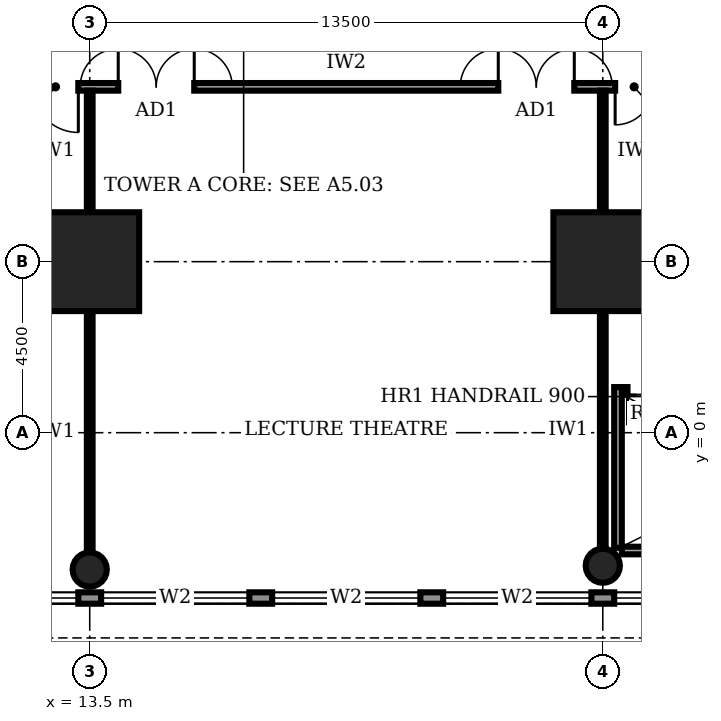
"""IFC4 building model, lengths in metres.
Left out: names, types, materials, properties, quantities, classifications, styles, units other than length and angle.
Written with IfcOpenShell. Run it as: python <this file> out.ifc"""

import sys

from ifc_helpers import new_model, si_unit, direction, frame, frame_2d, origin, origin_2d, place, context, subcontext, project, spatial, rectangle, circle, extrude, element, fill, save


model = new_model("IFC4")
c1 = context("Model", 3, precision=1e-05, world=origin(), true_north=direction((0.0, 1.0)))
c2 = subcontext(c1, "Body", "Model", "MODEL_VIEW")
j1 = project(units=[si_unit("LENGTHUNIT", "METRE"), si_unit("PLANEANGLEUNIT", "RADIAN")], contexts=[c1])
p1 = place(None, origin())
s1 = spatial("IfcSite", under=j1, at=p1, CompositionType="ELEMENT")
p2 = place(p1, origin())
s2 = spatial("IfcBuilding", under=s1, at=p2, CompositionType="ELEMENT")
p3 = place(p2, frame((0.0, 0.0, 6.0)))
s3 = spatial("IfcBuildingStorey", under=s2, at=p3, CompositionType="ELEMENT", Elevation=6.0)
for number, where, z_axis, x_axis in (
    (1, (13.5, 4.5, 0.0), (0.0, 0.0, 1.0), (1.0, 0.0, 0.0)),
    (2, (27.0, 4.5, 0.0), (0.0, 0.0, 1.0), (1.0, 0.0, 0.0)),
):
    element("IfcColumn", number, at=place(p3, frame(where, z_axis=z_axis, x_axis=x_axis)), inside=s3, PredefinedType="COLUMN", context=c2, shape_type="SweptSolid", body=[
        extrude(rectangle(XDim=2.6, YDim=2.6, at=origin_2d()), origin(), (0.0, 0.0, 1.0), 5.0),
    ])
for number, where, z_axis, x_axis in (
    (3, (13.5, -3.6, 0.0), (0.0, 0.0, 1.0), (1.0, 0.0, 0.0)),
    (4, (27.0, -3.5, 0.0), (0.0, 0.0, 1.0), (1.0, 0.0, 0.0)),
):
    element("IfcColumn", number, at=place(p3, frame(where, z_axis=z_axis, x_axis=x_axis)), inside=s3, PredefinedType="COLUMN", context=c2, shape_type="SweptSolid", body=[
        extrude(circle(Radius=0.45, at=origin_2d()), origin(), (0.0, 0.0, 1.0), 5.0),
    ])
p4 = place(p3, frame((0.02, -4.35, 0.0), z_axis=(0.0, 0.0, 1.0), x_axis=(1.0, 0.0, 0.0)))
e5 = element("IfcWall", 5, at=p4, inside=s3, PredefinedType="STANDARD", context=c2, shape_type="SweptSolid", body=[
    extrude(rectangle(XDim=98.96, YDim=0.3, at=frame_2d((49.48, 0.0))), origin(), (0.0, 0.0, 1.0), 4.7),
])
p5 = place(p4, frame((4.78, 0.0, 0.6)))
e6 = element("IfcOpeningElement", 6, at=p5, cuts=e5, PredefinedType="OPENING", context=c2, shape_type="SweptSolid", body=[
    extrude(rectangle(XDim=3.9, YDim=2.6, at=frame_2d((1.95, 1.3))), frame((0.0, 0.16, 0.0), z_axis=(0.0, -1.0, 0.0), x_axis=(1.0, 0.0, 0.0)), (0.0, 0.0, 1.0), 0.32),
])
p6 = place(p4, frame((9.28, 0.0, 0.6)))
e7 = element("IfcOpeningElement", 7, at=p6, cuts=e5, PredefinedType="OPENING", context=c2, shape_type="SweptSolid", body=[
    extrude(rectangle(XDim=3.9, YDim=2.6, at=frame_2d((1.95, 1.3))), frame((0.0, 0.16, 0.0), z_axis=(0.0, -1.0, 0.0), x_axis=(1.0, 0.0, 0.0)), (0.0, 0.0, 1.0), 0.32),
])
p7 = place(p4, frame((13.78, 0.0, 0.6)))
e8 = element("IfcOpeningElement", 8, at=p7, cuts=e5, PredefinedType="OPENING", context=c2, shape_type="SweptSolid", body=[
    extrude(rectangle(XDim=3.9, YDim=2.6, at=frame_2d((1.95, 1.3))), frame((0.0, 0.16, 0.0), z_axis=(0.0, -1.0, 0.0), x_axis=(1.0, 0.0, 0.0)), (0.0, 0.0, 1.0), 0.32),
])
p8 = place(p4, frame((18.28, 0.0, 0.6)))
e9 = element("IfcOpeningElement", 9, at=p8, cuts=e5, PredefinedType="OPENING", context=c2, shape_type="SweptSolid", body=[
    extrude(rectangle(XDim=3.9, YDim=2.6, at=frame_2d((1.95, 1.3))), frame((0.0, 0.16, 0.0), z_axis=(0.0, -1.0, 0.0), x_axis=(1.0, 0.0, 0.0)), (0.0, 0.0, 1.0), 0.32),
])
p9 = place(p4, frame((22.78, 0.0, 0.6)))
e10 = element("IfcOpeningElement", 10, at=p9, cuts=e5, PredefinedType="OPENING", context=c2, shape_type="SweptSolid", body=[
    extrude(rectangle(XDim=3.9, YDim=2.6, at=frame_2d((1.95, 1.3))), frame((0.0, 0.16, 0.0), z_axis=(0.0, -1.0, 0.0), x_axis=(1.0, 0.0, 0.0)), (0.0, 0.0, 1.0), 0.32),
])
p10 = place(p4, frame((27.28, 0.0, 0.6)))
e11 = element("IfcOpeningElement", 11, at=p10, cuts=e5, PredefinedType="OPENING", context=c2, shape_type="SweptSolid", body=[
    extrude(rectangle(XDim=3.9, YDim=2.6, at=frame_2d((1.95, 1.3))), frame((0.0, 0.16, 0.0), z_axis=(0.0, -1.0, 0.0), x_axis=(1.0, 0.0, 0.0)), (0.0, 0.0, 1.0), 0.32),
])
p11 = place(p4, frame((31.78, 0.0, 0.6)))
e12 = element("IfcOpeningElement", 12, at=p11, cuts=e5, PredefinedType="OPENING", context=c2, shape_type="SweptSolid", body=[
    extrude(rectangle(XDim=3.9, YDim=2.6, at=frame_2d((1.95, 1.3))), frame((0.0, 0.16, 0.0), z_axis=(0.0, -1.0, 0.0), x_axis=(1.0, 0.0, 0.0)), (0.0, 0.0, 1.0), 0.32),
])
p12 = place(p4, frame((36.28, 0.0, 0.6)))
e13 = element("IfcOpeningElement", 13, at=p12, cuts=e5, PredefinedType="OPENING", context=c2, shape_type="SweptSolid", body=[
    extrude(rectangle(XDim=3.9, YDim=2.6, at=frame_2d((1.95, 1.3))), frame((0.0, 0.16, 0.0), z_axis=(0.0, -1.0, 0.0), x_axis=(1.0, 0.0, 0.0)), (0.0, 0.0, 1.0), 0.32),
])
p13 = place(p4, frame((40.78, 0.0, 0.6)))
e14 = element("IfcOpeningElement", 14, at=p13, cuts=e5, PredefinedType="OPENING", context=c2, shape_type="SweptSolid", body=[
    extrude(rectangle(XDim=3.9, YDim=2.6, at=frame_2d((1.95, 1.3))), frame((0.0, 0.16, 0.0), z_axis=(0.0, -1.0, 0.0), x_axis=(1.0, 0.0, 0.0)), (0.0, 0.0, 1.0), 0.32),
])
p14 = place(p4, frame((45.28, 0.0, 0.6)))
e15 = element("IfcOpeningElement", 15, at=p14, cuts=e5, PredefinedType="OPENING", context=c2, shape_type="SweptSolid", body=[
    extrude(rectangle(XDim=3.9, YDim=2.6, at=frame_2d((1.95, 1.3))), frame((0.0, 0.16, 0.0), z_axis=(0.0, -1.0, 0.0), x_axis=(1.0, 0.0, 0.0)), (0.0, 0.0, 1.0), 0.32),
])
p15 = place(p4, frame((49.78, 0.0, 0.6)))
e16 = element("IfcOpeningElement", 16, at=p15, cuts=e5, PredefinedType="OPENING", context=c2, shape_type="SweptSolid", body=[
    extrude(rectangle(XDim=3.9, YDim=2.6, at=frame_2d((1.95, 1.3))), frame((0.0, 0.16, 0.0), z_axis=(0.0, -1.0, 0.0), x_axis=(1.0, 0.0, 0.0)), (0.0, 0.0, 1.0), 0.32),
])
p16 = place(p4, frame((54.28, 0.0, 0.6)))
e17 = element("IfcOpeningElement", 17, at=p16, cuts=e5, PredefinedType="OPENING", context=c2, shape_type="SweptSolid", body=[
    extrude(rectangle(XDim=3.9, YDim=2.6, at=frame_2d((1.95, 1.3))), frame((0.0, 0.16, 0.0), z_axis=(0.0, -1.0, 0.0), x_axis=(1.0, 0.0, 0.0)), (0.0, 0.0, 1.0), 0.32),
])
p17 = place(p4, frame((58.78, 0.0, 0.6)))
e18 = element("IfcOpeningElement", 18, at=p17, cuts=e5, PredefinedType="OPENING", context=c2, shape_type="SweptSolid", body=[
    extrude(rectangle(XDim=3.9, YDim=2.6, at=frame_2d((1.95, 1.3))), frame((0.0, 0.16, 0.0), z_axis=(0.0, -1.0, 0.0), x_axis=(1.0, 0.0, 0.0)), (0.0, 0.0, 1.0), 0.32),
])
p18 = place(p4, frame((63.28, 0.0, 0.6)))
e19 = element("IfcOpeningElement", 19, at=p18, cuts=e5, PredefinedType="OPENING", context=c2, shape_type="SweptSolid", body=[
    extrude(rectangle(XDim=3.9, YDim=2.6, at=frame_2d((1.95, 1.3))), frame((0.0, 0.16, 0.0), z_axis=(0.0, -1.0, 0.0), x_axis=(1.0, 0.0, 0.0)), (0.0, 0.0, 1.0), 0.32),
])
p19 = place(p4, frame((67.78, 0.0, 0.6)))
e20 = element("IfcOpeningElement", 20, at=p19, cuts=e5, PredefinedType="OPENING", context=c2, shape_type="SweptSolid", body=[
    extrude(rectangle(XDim=3.9, YDim=2.6, at=frame_2d((1.95, 1.3))), frame((0.0, 0.16, 0.0), z_axis=(0.0, -1.0, 0.0), x_axis=(1.0, 0.0, 0.0)), (0.0, 0.0, 1.0), 0.32),
])
p20 = place(p4, frame((72.28, 0.0, 0.6)))
e21 = element("IfcOpeningElement", 21, at=p20, cuts=e5, PredefinedType="OPENING", context=c2, shape_type="SweptSolid", body=[
    extrude(rectangle(XDim=3.9, YDim=2.6, at=frame_2d((1.95, 1.3))), frame((0.0, 0.16, 0.0), z_axis=(0.0, -1.0, 0.0), x_axis=(1.0, 0.0, 0.0)), (0.0, 0.0, 1.0), 0.32),
])
p21 = place(p4, frame((76.78, 0.0, 0.6)))
e22 = element("IfcOpeningElement", 22, at=p21, cuts=e5, PredefinedType="OPENING", context=c2, shape_type="SweptSolid", body=[
    extrude(rectangle(XDim=3.9, YDim=2.6, at=frame_2d((1.95, 1.3))), frame((0.0, 0.16, 0.0), z_axis=(0.0, -1.0, 0.0), x_axis=(1.0, 0.0, 0.0)), (0.0, 0.0, 1.0), 0.32),
])
p22 = place(p4, frame((81.28, 0.0, 0.6)))
e23 = element("IfcOpeningElement", 23, at=p22, cuts=e5, PredefinedType="OPENING", context=c2, shape_type="SweptSolid", body=[
    extrude(rectangle(XDim=3.9, YDim=2.6, at=frame_2d((1.95, 1.3))), frame((0.0, 0.16, 0.0), z_axis=(0.0, -1.0, 0.0), x_axis=(1.0, 0.0, 0.0)), (0.0, 0.0, 1.0), 0.32),
])
p23 = place(p4, frame((85.78, 0.0, 0.6)))
e24 = element("IfcOpeningElement", 24, at=p23, cuts=e5, PredefinedType="OPENING", context=c2, shape_type="SweptSolid", body=[
    extrude(rectangle(XDim=3.9, YDim=2.6, at=frame_2d((1.95, 1.3))), frame((0.0, 0.16, 0.0), z_axis=(0.0, -1.0, 0.0), x_axis=(1.0, 0.0, 0.0)), (0.0, 0.0, 1.0), 0.32),
])
p24 = place(p4, frame((90.28, 0.0, 0.6)))
e25 = element("IfcOpeningElement", 25, at=p24, cuts=e5, PredefinedType="OPENING", context=c2, shape_type="SweptSolid", body=[
    extrude(rectangle(XDim=3.9, YDim=2.6, at=frame_2d((1.95, 1.3))), frame((0.0, 0.16, 0.0), z_axis=(0.0, -1.0, 0.0), x_axis=(1.0, 0.0, 0.0)), (0.0, 0.0, 1.0), 0.32),
])
p25 = place(p4, frame((94.78, 0.0, 0.6)))
e26 = element("IfcOpeningElement", 26, at=p25, cuts=e5, PredefinedType="OPENING", context=c2, shape_type="SweptSolid", body=[
    extrude(rectangle(XDim=3.9, YDim=2.6, at=frame_2d((1.95, 1.3))), frame((0.0, 0.16, 0.0), z_axis=(0.0, -1.0, 0.0), x_axis=(1.0, 0.0, 0.0)), (0.0, 0.0, 1.0), 0.32),
])
p26 = place(p3, frame((11.9, 9.1, 0.0), z_axis=(0.0, 0.0, 1.0), x_axis=(1.0, 0.0, 0.0)))
e27 = element("IfcWall", 27, at=p26, inside=s3, PredefinedType="SOLIDWALL", context=c2, shape_type="SweptSolid", body=[
    extrude(rectangle(XDim=16.9, YDim=0.2, at=frame_2d((8.45, 0.0))), origin(), (0.0, 0.0, 1.0), 4.7),
])
p27 = place(p26, frame((0.1, 0.0, 0.0)))
e28 = element("IfcOpeningElement", 28, at=p27, cuts=e27, PredefinedType="OPENING", context=c2, shape_type="SweptSolid", body=[
    extrude(rectangle(XDim=1.2, YDim=2.4, at=frame_2d((0.6, 1.2))), frame((0.0, 0.11, 0.0), z_axis=(0.0, -1.0, 0.0), x_axis=(1.0, 0.0, 0.0)), (0.0, 0.0, 1.0), 0.22),
])
p28 = place(p26, frame((2.35, 0.0, 0.0)))
e29 = element("IfcOpeningElement", 29, at=p28, cuts=e27, PredefinedType="OPENING", context=c2, shape_type="SweptSolid", body=[
    extrude(rectangle(XDim=2.0, YDim=2.4, at=frame_2d((1.0, 1.2))), frame((0.0, 0.11, 0.0), z_axis=(0.0, -1.0, 0.0), x_axis=(1.0, 0.0, 0.0)), (0.0, 0.0, 1.0), 0.22),
])
p29 = place(p26, frame((12.35, 0.0, 0.0)))
e30 = element("IfcOpeningElement", 30, at=p29, cuts=e27, PredefinedType="OPENING", context=c2, shape_type="SweptSolid", body=[
    extrude(rectangle(XDim=2.0, YDim=2.4, at=frame_2d((1.0, 1.2))), frame((0.0, 0.11, 0.0), z_axis=(0.0, -1.0, 0.0), x_axis=(1.0, 0.0, 0.0)), (0.0, 0.0, 1.0), 0.22),
])
p30 = place(p26, frame((15.425, 0.0, 0.0)))
e31 = element("IfcOpeningElement", 31, at=p30, cuts=e27, PredefinedType="OPENING", context=c2, shape_type="SweptSolid", body=[
    extrude(rectangle(XDim=1.0, YDim=2.1, at=frame_2d((0.5, 1.05))), frame((0.0, 0.11, 0.0), z_axis=(0.0, -1.0, 0.0), x_axis=(1.0, 0.0, 0.0)), (0.0, 0.0, 1.0), 0.22),
])
p31 = place(p3, frame((13.5, -3.13, 0.0), z_axis=(0.0, 0.0, 1.0), x_axis=(0.0, 1.0, 0.0)))
e32 = element("IfcWall", 32, at=p31, inside=s3, PredefinedType="PARTITIONING", context=c2, shape_type="SweptSolid", body=[
    extrude(rectangle(XDim=6.31, YDim=0.15, at=frame_2d((3.155, 0.0))), origin(), (0.0, 0.0, 1.0), 3.7),
])
p32 = place(p3, frame((13.5, 5.82, 0.0), z_axis=(0.0, 0.0, 1.0), x_axis=(0.0, 1.0, 0.0)))
e33 = element("IfcWall", 33, at=p32, inside=s3, PredefinedType="PARTITIONING", context=c2, shape_type="SweptSolid", body=[
    extrude(rectangle(XDim=3.18, YDim=0.15, at=frame_2d((1.59, 0.0))), origin(), (0.0, 0.0, 1.0), 3.8),
])
p33 = place(p3, frame((27.0, -3.03, 0.0), z_axis=(0.0, 0.0, 1.0), x_axis=(0.0, 1.0, 0.0)))
e34 = element("IfcWall", 34, at=p33, inside=s3, PredefinedType="PARTITIONING", context=c2, shape_type="SweptSolid", body=[
    extrude(rectangle(XDim=6.21, YDim=0.15, at=frame_2d((3.105, 0.0))), origin(), (0.0, 0.0, 1.0), 3.7),
])
p34 = place(p3, frame((27.0, 5.82, 0.0), z_axis=(0.0, 0.0, 1.0), x_axis=(0.0, 1.0, 0.0)))
e35 = element("IfcWall", 35, at=p34, inside=s3, PredefinedType="PARTITIONING", context=c2, shape_type="SweptSolid", body=[
    extrude(rectangle(XDim=3.18, YDim=0.15, at=frame_2d((1.59, 0.0))), origin(), (0.0, 0.0, 1.0), 3.8),
])
p35 = place(p3, frame((27.5, 1.1, 0.0), z_axis=(0.0, 0.0, 1.0), x_axis=(1.0, 0.0, 0.0)))
e36 = element("IfcWall", 36, at=p35, inside=s3, PredefinedType="SOLIDWALL", context=c2, shape_type="SweptSolid", body=[
    extrude(rectangle(XDim=8.0, YDim=0.2, at=frame_2d((4.0, 0.0))), origin(), (0.0, 0.0, 1.0), 4.7),
])
p36 = place(p35, frame((0.15, 0.0, 0.0)))
e37 = element("IfcOpeningElement", 37, at=p36, cuts=e36, PredefinedType="OPENING", context=c2, shape_type="SweptSolid", body=[
    extrude(rectangle(XDim=1.8, YDim=2.1, at=frame_2d((0.9, 1.05))), frame((0.0, 0.11, 0.0), z_axis=(0.0, -1.0, 0.0), x_axis=(1.0, 0.0, 0.0)), (0.0, 0.0, 1.0), 0.22),
])
p37 = place(p3, frame((27.5, -3.1, 0.0), z_axis=(0.0, 0.0, 1.0), x_axis=(1.0, 0.0, 0.0)))
e38 = element("IfcWall", 38, at=p37, inside=s3, PredefinedType="SOLIDWALL", context=c2, shape_type="SweptSolid", body=[
    extrude(rectangle(XDim=8.0, YDim=0.2, at=frame_2d((4.0, 0.0))), origin(), (0.0, 0.0, 1.0), 4.7),
])
p38 = place(p3, frame((27.4, -3.03, 0.0), z_axis=(0.0, 0.0, 1.0), x_axis=(0.0, 1.0, 0.0)))
e39 = element("IfcWall", 39, at=p38, inside=s3, PredefinedType="SOLIDWALL", context=c2, shape_type="SweptSolid", body=[
    extrude(rectangle(XDim=4.23, YDim=0.2, at=frame_2d((2.115, 0.0))), origin(), (0.0, 0.0, 1.0), 4.7),
])
p39 = place(p6, origin())
e40 = element("IfcWindow", 40, at=p39, inside=s3, PartitioningType="SINGLE_PANEL", PredefinedType="WINDOW", context=c2, shape_type="SweptSolid", body=[
    extrude(rectangle(XDim=3.9, YDim=2.6, at=frame_2d((1.95, 1.3))), frame((0.0, 0.03, 0.0), z_axis=(0.0, -1.0, 0.0), x_axis=(1.0, 0.0, 0.0)), (0.0, 0.0, 1.0), 0.06),
])
fill(e7, e40)
p40 = place(p7, origin())
e41 = element("IfcWindow", 41, at=p40, inside=s3, PartitioningType="SINGLE_PANEL", PredefinedType="WINDOW", context=c2, shape_type="SweptSolid", body=[
    extrude(rectangle(XDim=3.9, YDim=2.6, at=frame_2d((1.95, 1.3))), frame((0.0, 0.03, 0.0), z_axis=(0.0, -1.0, 0.0), x_axis=(1.0, 0.0, 0.0)), (0.0, 0.0, 1.0), 0.06),
])
fill(e8, e41)
p41 = place(p8, origin())
e42 = element("IfcWindow", 42, at=p41, inside=s3, PartitioningType="SINGLE_PANEL", PredefinedType="WINDOW", context=c2, shape_type="SweptSolid", body=[
    extrude(rectangle(XDim=3.9, YDim=2.6, at=frame_2d((1.95, 1.3))), frame((0.0, 0.03, 0.0), z_axis=(0.0, -1.0, 0.0), x_axis=(1.0, 0.0, 0.0)), (0.0, 0.0, 1.0), 0.06),
])
fill(e9, e42)
p42 = place(p9, origin())
e43 = element("IfcWindow", 43, at=p42, inside=s3, PartitioningType="SINGLE_PANEL", PredefinedType="WINDOW", context=c2, shape_type="SweptSolid", body=[
    extrude(rectangle(XDim=3.9, YDim=2.6, at=frame_2d((1.95, 1.3))), frame((0.0, 0.03, 0.0), z_axis=(0.0, -1.0, 0.0), x_axis=(1.0, 0.0, 0.0)), (0.0, 0.0, 1.0), 0.06),
])
fill(e10, e43)
p43 = place(p10, origin())
e44 = element("IfcWindow", 44, at=p43, inside=s3, PartitioningType="SINGLE_PANEL", PredefinedType="WINDOW", context=c2, shape_type="SweptSolid", body=[
    extrude(rectangle(XDim=3.9, YDim=2.6, at=frame_2d((1.95, 1.3))), frame((0.0, 0.03, 0.0), z_axis=(0.0, -1.0, 0.0), x_axis=(1.0, 0.0, 0.0)), (0.0, 0.0, 1.0), 0.06),
])
fill(e11, e44)
p44 = place(p27, frame((1.2, 0.0, 0.0), z_axis=(0.0, 0.0, 1.0), x_axis=(-1.0, 0.0, 0.0)))
e45 = element("IfcDoor", 45, at=p44, inside=s3, OperationType="SINGLE_SWING_LEFT", PredefinedType="DOOR", context=c2, shape_type="SweptSolid", body=[
    extrude(rectangle(XDim=1.2, YDim=2.4, at=frame_2d((0.6, 1.2))), frame((0.0, 0.025, 0.0), z_axis=(0.0, -1.0, 0.0), x_axis=(1.0, 0.0, 0.0)), (0.0, 0.0, 1.0), 0.05),
])
fill(e28, e45)
p45 = place(p28, origin())
e46 = element("IfcDoor", 46, at=p45, inside=s3, OperationType="DOUBLE_DOOR_SINGLE_SWING", PredefinedType="DOOR", context=c2, shape_type="SweptSolid", body=[
    extrude(rectangle(XDim=2.0, YDim=2.4, at=frame_2d((1.0, 1.2))), frame((0.0, 0.025, 0.0), z_axis=(0.0, -1.0, 0.0), x_axis=(1.0, 0.0, 0.0)), (0.0, 0.0, 1.0), 0.05),
])
fill(e29, e46)
p46 = place(p29, origin())
e47 = element("IfcDoor", 47, at=p46, inside=s3, OperationType="DOUBLE_DOOR_SINGLE_SWING", PredefinedType="DOOR", context=c2, shape_type="SweptSolid", body=[
    extrude(rectangle(XDim=2.0, YDim=2.4, at=frame_2d((1.0, 1.2))), frame((0.0, 0.025, 0.0), z_axis=(0.0, -1.0, 0.0), x_axis=(1.0, 0.0, 0.0)), (0.0, 0.0, 1.0), 0.05),
])
fill(e30, e47)
p47 = place(p30, frame((1.0, 0.0, 0.0), z_axis=(0.0, 0.0, 1.0), x_axis=(-1.0, 0.0, 0.0)))
e48 = element("IfcDoor", 48, at=p47, inside=s3, OperationType="SINGLE_SWING_RIGHT", PredefinedType="DOOR", context=c2, shape_type="SweptSolid", body=[
    extrude(rectangle(XDim=1.0, YDim=2.1, at=frame_2d((0.5, 1.05))), frame((0.0, 0.025, 0.0), z_axis=(0.0, -1.0, 0.0), x_axis=(1.0, 0.0, 0.0)), (0.0, 0.0, 1.0), 0.05),
])
fill(e31, e48)
p48 = place(p36, frame((1.8, 0.0, 0.0), z_axis=(0.0, 0.0, 1.0), x_axis=(-1.0, 0.0, 0.0)))
e49 = element("IfcDoor", 49, at=p48, inside=s3, OperationType="DOUBLE_DOOR_SINGLE_SWING", PredefinedType="DOOR", context=c2, shape_type="SweptSolid", body=[
    extrude(rectangle(XDim=1.8, YDim=2.1, at=frame_2d((0.9, 1.05))), frame((0.0, 0.025, 0.0), z_axis=(0.0, -1.0, 0.0), x_axis=(1.0, 0.0, 0.0)), (0.0, 0.0, 1.0), 0.05),
])
fill(e37, e49)
save(model, sys.argv[1])
